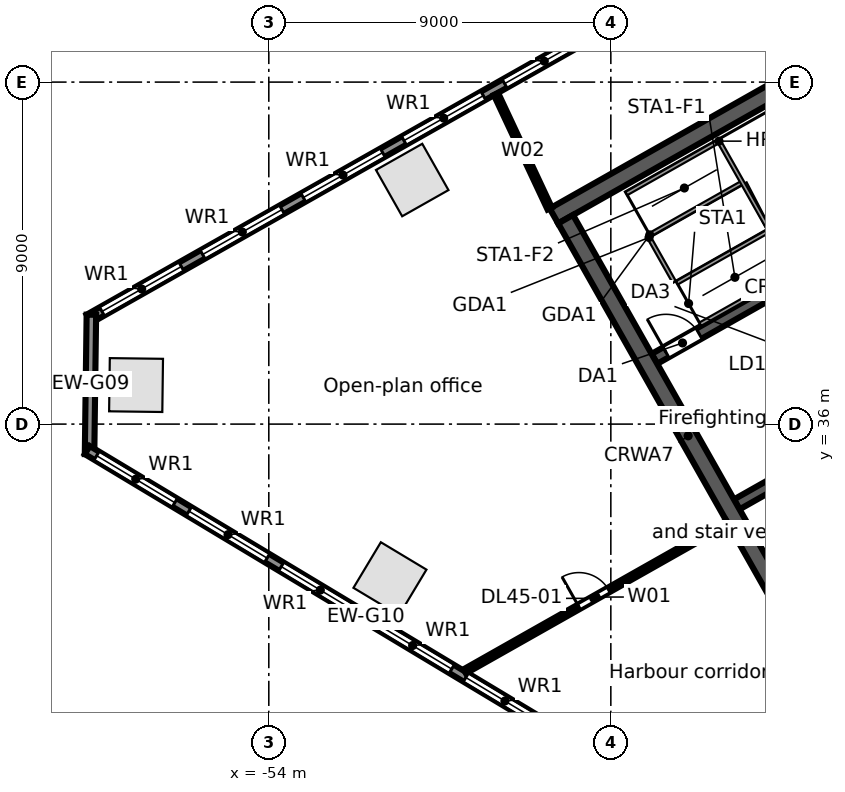
"""IFC4 building model, lengths in metres.
Left out: names, types, materials, properties, quantities, classifications, styles, units other than length and angle.
Written with IfcOpenShell. Run it as: python <this file> out.ifc"""

import sys

from ifc_helpers import new_model, si_unit, direction, frame, frame_2d, origin, origin_2d, place, context, subcontext, project, spatial, rectangle, extrude, element, fill, save


model = new_model("IFC4")
c1 = context("Model", 3, precision=1e-05, world=origin(), true_north=direction((0.0, 1.0)))
c2 = subcontext(c1, "Body", "Model", "MODEL_VIEW")
j1 = project(units=[si_unit("LENGTHUNIT", "METRE"), si_unit("PLANEANGLEUNIT", "RADIAN")], contexts=[c1])
p1 = place(None, origin())
s1 = spatial("IfcSite", under=j1, at=p1, CompositionType="ELEMENT")
p2 = place(p1, origin())
s2 = spatial("IfcBuilding", under=s1, at=p2, CompositionType="ELEMENT")
p3 = place(p2, frame((0.0, 0.0, 207.5)))
s3 = spatial("IfcBuildingStorey", under=s2, at=p3, CompositionType="ELEMENT", Elevation=207.5)
for number, where, z_axis, x_axis in (
    (1, (-50.226, 42.423, 0.0), (0.0, 0.0, 1.0), (-0.87, -0.492, 0.0)),
    (2, (-57.493, 37.027, 0.0), (0.0, 0.0, 1.0), (-0.013, -1.0, 0.0)),
    (3, (-50.812, 31.931, 0.0), (0.0, 0.0, 1.0), (0.857, -0.515, 0.0)),
):
    element("IfcColumn", number, at=place(p3, frame(where, z_axis=z_axis, x_axis=x_axis)), inside=s3, PredefinedType="COLUMN", context=c2, shape_type="SweptSolid", body=[
        extrude(rectangle(XDim=1.4, YDim=1.4, at=origin_2d()), origin(), (0.0, 0.0, 1.0), 3.9),
    ])
p4 = place(p3, frame((-58.732, 38.771, 0.0), z_axis=(0.0, 0.0, 1.0), x_axis=(0.870354824205, 0.492425100887, 0.0)))
e4 = element("IfcWall", 4, at=p4, inside=s3, PredefinedType="STANDARD", context=c2, shape_type="SweptSolid", body=[
    extrude(rectangle(XDim=64.006, YDim=0.25, at=frame_2d((32.003, 0.0))), origin(), (0.0, 0.0, 1.0), 3.62),
])
p5 = place(p4, frame((61.259, 0.0, 0.8)))
e5 = element("IfcOpeningElement", 5, at=p5, cuts=e4, PredefinedType="OPENING", context=c2, shape_type="SweptSolid", body=[
    extrude(rectangle(XDim=2.4, YDim=2.2, at=frame_2d((1.2, 1.1))), frame((0.0, 0.135, 0.0), z_axis=(0.0, -1.0, 0.0), x_axis=(1.0, 0.0, 0.0)), (0.0, 0.0, 1.0), 0.27),
])
p6 = place(p4, frame((58.216, 0.0, 0.8)))
e6 = element("IfcOpeningElement", 6, at=p6, cuts=e4, PredefinedType="OPENING", context=c2, shape_type="SweptSolid", body=[
    extrude(rectangle(XDim=2.4, YDim=2.2, at=frame_2d((1.2, 1.1))), frame((0.0, 0.135, 0.0), z_axis=(0.0, -1.0, 0.0), x_axis=(1.0, 0.0, 0.0)), (0.0, 0.0, 1.0), 0.27),
])
p7 = place(p4, frame((55.173, 0.0, 0.8)))
e7 = element("IfcOpeningElement", 7, at=p7, cuts=e4, PredefinedType="OPENING", context=c2, shape_type="SweptSolid", body=[
    extrude(rectangle(XDim=2.4, YDim=2.2, at=frame_2d((1.2, 1.1))), frame((0.0, 0.135, 0.0), z_axis=(0.0, -1.0, 0.0), x_axis=(1.0, 0.0, 0.0)), (0.0, 0.0, 1.0), 0.27),
])
p8 = place(p4, frame((52.129, 0.0, 0.8)))
e8 = element("IfcOpeningElement", 8, at=p8, cuts=e4, PredefinedType="OPENING", context=c2, shape_type="SweptSolid", body=[
    extrude(rectangle(XDim=2.4, YDim=2.2, at=frame_2d((1.2, 1.1))), frame((0.0, 0.135, 0.0), z_axis=(0.0, -1.0, 0.0), x_axis=(1.0, 0.0, 0.0)), (0.0, 0.0, 1.0), 0.27),
])
p9 = place(p4, frame((49.086, 0.0, 0.8)))
e9 = element("IfcOpeningElement", 9, at=p9, cuts=e4, PredefinedType="OPENING", context=c2, shape_type="SweptSolid", body=[
    extrude(rectangle(XDim=2.4, YDim=2.2, at=frame_2d((1.2, 1.1))), frame((0.0, 0.135, 0.0), z_axis=(0.0, -1.0, 0.0), x_axis=(1.0, 0.0, 0.0)), (0.0, 0.0, 1.0), 0.27),
])
p10 = place(p4, frame((46.043, 0.0, 0.8)))
e10 = element("IfcOpeningElement", 10, at=p10, cuts=e4, PredefinedType="OPENING", context=c2, shape_type="SweptSolid", body=[
    extrude(rectangle(XDim=2.4, YDim=2.2, at=frame_2d((1.2, 1.1))), frame((0.0, 0.135, 0.0), z_axis=(0.0, -1.0, 0.0), x_axis=(1.0, 0.0, 0.0)), (0.0, 0.0, 1.0), 0.27),
])
p11 = place(p4, frame((43.0, 0.0, 0.8)))
e11 = element("IfcOpeningElement", 11, at=p11, cuts=e4, PredefinedType="OPENING", context=c2, shape_type="SweptSolid", body=[
    extrude(rectangle(XDim=2.4, YDim=2.2, at=frame_2d((1.2, 1.1))), frame((0.0, 0.135, 0.0), z_axis=(0.0, -1.0, 0.0), x_axis=(1.0, 0.0, 0.0)), (0.0, 0.0, 1.0), 0.27),
])
p12 = place(p4, frame((39.956, 0.0, 0.8)))
e12 = element("IfcOpeningElement", 12, at=p12, cuts=e4, PredefinedType="OPENING", context=c2, shape_type="SweptSolid", body=[
    extrude(rectangle(XDim=2.4, YDim=2.2, at=frame_2d((1.2, 1.1))), frame((0.0, 0.135, 0.0), z_axis=(0.0, -1.0, 0.0), x_axis=(1.0, 0.0, 0.0)), (0.0, 0.0, 1.0), 0.27),
])
p13 = place(p4, frame((36.913, 0.0, 0.8)))
e13 = element("IfcOpeningElement", 13, at=p13, cuts=e4, PredefinedType="OPENING", context=c2, shape_type="SweptSolid", body=[
    extrude(rectangle(XDim=2.4, YDim=2.2, at=frame_2d((1.2, 1.1))), frame((0.0, 0.135, 0.0), z_axis=(0.0, -1.0, 0.0), x_axis=(1.0, 0.0, 0.0)), (0.0, 0.0, 1.0), 0.27),
])
p14 = place(p4, frame((33.87, 0.0, 0.8)))
e14 = element("IfcOpeningElement", 14, at=p14, cuts=e4, PredefinedType="OPENING", context=c2, shape_type="SweptSolid", body=[
    extrude(rectangle(XDim=2.4, YDim=2.2, at=frame_2d((1.2, 1.1))), frame((0.0, 0.135, 0.0), z_axis=(0.0, -1.0, 0.0), x_axis=(1.0, 0.0, 0.0)), (0.0, 0.0, 1.0), 0.27),
])
p15 = place(p4, frame((30.826, 0.0, 0.8)))
e15 = element("IfcOpeningElement", 15, at=p15, cuts=e4, PredefinedType="OPENING", context=c2, shape_type="SweptSolid", body=[
    extrude(rectangle(XDim=2.4, YDim=2.2, at=frame_2d((1.2, 1.1))), frame((0.0, 0.135, 0.0), z_axis=(0.0, -1.0, 0.0), x_axis=(1.0, 0.0, 0.0)), (0.0, 0.0, 1.0), 0.27),
])
p16 = place(p4, frame((27.783, 0.0, 0.8)))
e16 = element("IfcOpeningElement", 16, at=p16, cuts=e4, PredefinedType="OPENING", context=c2, shape_type="SweptSolid", body=[
    extrude(rectangle(XDim=2.4, YDim=2.2, at=frame_2d((1.2, 1.1))), frame((0.0, 0.135, 0.0), z_axis=(0.0, -1.0, 0.0), x_axis=(1.0, 0.0, 0.0)), (0.0, 0.0, 1.0), 0.27),
])
p17 = place(p4, frame((24.74, 0.0, 0.8)))
e17 = element("IfcOpeningElement", 17, at=p17, cuts=e4, PredefinedType="OPENING", context=c2, shape_type="SweptSolid", body=[
    extrude(rectangle(XDim=2.4, YDim=2.2, at=frame_2d((1.2, 1.1))), frame((0.0, 0.135, 0.0), z_axis=(0.0, -1.0, 0.0), x_axis=(1.0, 0.0, 0.0)), (0.0, 0.0, 1.0), 0.27),
])
p18 = place(p4, frame((21.696, 0.0, 0.8)))
e18 = element("IfcOpeningElement", 18, at=p18, cuts=e4, PredefinedType="OPENING", context=c2, shape_type="SweptSolid", body=[
    extrude(rectangle(XDim=2.4, YDim=2.2, at=frame_2d((1.2, 1.1))), frame((0.0, 0.135, 0.0), z_axis=(0.0, -1.0, 0.0), x_axis=(1.0, 0.0, 0.0)), (0.0, 0.0, 1.0), 0.27),
])
p19 = place(p4, frame((18.653, 0.0, 0.8)))
e19 = element("IfcOpeningElement", 19, at=p19, cuts=e4, PredefinedType="OPENING", context=c2, shape_type="SweptSolid", body=[
    extrude(rectangle(XDim=2.4, YDim=2.2, at=frame_2d((1.2, 1.1))), frame((0.0, 0.135, 0.0), z_axis=(0.0, -1.0, 0.0), x_axis=(1.0, 0.0, 0.0)), (0.0, 0.0, 1.0), 0.27),
])
p20 = place(p4, frame((15.61, 0.0, 0.8)))
e20 = element("IfcOpeningElement", 20, at=p20, cuts=e4, PredefinedType="OPENING", context=c2, shape_type="SweptSolid", body=[
    extrude(rectangle(XDim=2.4, YDim=2.2, at=frame_2d((1.2, 1.1))), frame((0.0, 0.135, 0.0), z_axis=(0.0, -1.0, 0.0), x_axis=(1.0, 0.0, 0.0)), (0.0, 0.0, 1.0), 0.27),
])
p21 = place(p4, frame((12.567, 0.0, 0.8)))
e21 = element("IfcOpeningElement", 21, at=p21, cuts=e4, PredefinedType="OPENING", context=c2, shape_type="SweptSolid", body=[
    extrude(rectangle(XDim=2.4, YDim=2.2, at=frame_2d((1.2, 1.1))), frame((0.0, 0.135, 0.0), z_axis=(0.0, -1.0, 0.0), x_axis=(1.0, 0.0, 0.0)), (0.0, 0.0, 1.0), 0.27),
])
p22 = place(p4, frame((9.523, 0.0, 0.8)))
e22 = element("IfcOpeningElement", 22, at=p22, cuts=e4, PredefinedType="OPENING", context=c2, shape_type="SweptSolid", body=[
    extrude(rectangle(XDim=2.4, YDim=2.2, at=frame_2d((1.2, 1.1))), frame((0.0, 0.135, 0.0), z_axis=(0.0, -1.0, 0.0), x_axis=(1.0, 0.0, 0.0)), (0.0, 0.0, 1.0), 0.27),
])
p23 = place(p4, frame((6.48, 0.0, 0.8)))
e23 = element("IfcOpeningElement", 23, at=p23, cuts=e4, PredefinedType="OPENING", context=c2, shape_type="SweptSolid", body=[
    extrude(rectangle(XDim=2.4, YDim=2.2, at=frame_2d((1.2, 1.1))), frame((0.0, 0.135, 0.0), z_axis=(0.0, -1.0, 0.0), x_axis=(1.0, 0.0, 0.0)), (0.0, 0.0, 1.0), 0.27),
])
p24 = place(p4, frame((3.437, 0.0, 0.8)))
e24 = element("IfcOpeningElement", 24, at=p24, cuts=e4, PredefinedType="OPENING", context=c2, shape_type="SweptSolid", body=[
    extrude(rectangle(XDim=2.4, YDim=2.2, at=frame_2d((1.2, 1.1))), frame((0.0, 0.135, 0.0), z_axis=(0.0, -1.0, 0.0), x_axis=(1.0, 0.0, 0.0)), (0.0, 0.0, 1.0), 0.27),
])
p25 = place(p4, frame((0.393, 0.0, 0.8)))
e25 = element("IfcOpeningElement", 25, at=p25, cuts=e4, PredefinedType="OPENING", context=c2, shape_type="SweptSolid", body=[
    extrude(rectangle(XDim=2.4, YDim=2.2, at=frame_2d((1.2, 1.1))), frame((0.0, 0.135, 0.0), z_axis=(0.0, -1.0, 0.0), x_axis=(1.0, 0.0, 0.0)), (0.0, 0.0, 1.0), 0.27),
])
p26 = place(p3, frame((-58.717, 35.208, 0.0), z_axis=(0.0, 0.0, 1.0), x_axis=(0.01310512158, 0.999914124207, 0.0)))
e26 = element("IfcWall", 26, at=p26, inside=s3, PredefinedType="STANDARD", context=c2, shape_type="SweptSolid", body=[
    extrude(rectangle(XDim=3.67, YDim=0.25, at=frame_2d((1.835, 0.0))), origin(), (0.0, 0.0, 1.0), 3.62),
])
p27 = place(p3, frame((-44.115, 26.507, 0.0), z_axis=(0.0, 0.0, 1.0), x_axis=(-0.857166583633, 0.515039268311, 0.0)))
e27 = element("IfcWall", 27, at=p27, inside=s3, PredefinedType="STANDARD", context=c2, shape_type="SweptSolid", body=[
    extrude(rectangle(XDim=17.106, YDim=0.25, at=frame_2d((8.553, 0.0))), origin(), (0.0, 0.0, 1.0), 3.62),
])
p28 = place(p27, frame((14.417, 0.0, 0.8)))
e28 = element("IfcOpeningElement", 28, at=p28, cuts=e27, PredefinedType="OPENING", context=c2, shape_type="SweptSolid", body=[
    extrude(rectangle(XDim=2.4, YDim=2.2, at=frame_2d((1.2, 1.1))), frame((0.0, 0.135, 0.0), z_axis=(0.0, -1.0, 0.0), x_axis=(1.0, 0.0, 0.0)), (0.0, 0.0, 1.0), 0.27),
])
p29 = place(p27, frame((11.584, 0.0, 0.8)))
e29 = element("IfcOpeningElement", 29, at=p29, cuts=e27, PredefinedType="OPENING", context=c2, shape_type="SweptSolid", body=[
    extrude(rectangle(XDim=2.4, YDim=2.2, at=frame_2d((1.2, 1.1))), frame((0.0, 0.135, 0.0), z_axis=(0.0, -1.0, 0.0), x_axis=(1.0, 0.0, 0.0)), (0.0, 0.0, 1.0), 0.27),
])
p30 = place(p27, frame((8.75, 0.0, 0.8)))
e30 = element("IfcOpeningElement", 30, at=p30, cuts=e27, PredefinedType="OPENING", context=c2, shape_type="SweptSolid", body=[
    extrude(rectangle(XDim=2.4, YDim=2.2, at=frame_2d((1.2, 1.1))), frame((0.0, 0.135, 0.0), z_axis=(0.0, -1.0, 0.0), x_axis=(1.0, 0.0, 0.0)), (0.0, 0.0, 1.0), 0.27),
])
p31 = place(p27, frame((5.917, 0.0, 0.8)))
e31 = element("IfcOpeningElement", 31, at=p31, cuts=e27, PredefinedType="OPENING", context=c2, shape_type="SweptSolid", body=[
    extrude(rectangle(XDim=2.4, YDim=2.2, at=frame_2d((1.2, 1.1))), frame((0.0, 0.135, 0.0), z_axis=(0.0, -1.0, 0.0), x_axis=(1.0, 0.0, 0.0)), (0.0, 0.0, 1.0), 0.27),
])
p32 = place(p27, frame((3.084, 0.0, 0.8)))
e32 = element("IfcOpeningElement", 32, at=p32, cuts=e27, PredefinedType="OPENING", context=c2, shape_type="SweptSolid", body=[
    extrude(rectangle(XDim=2.4, YDim=2.2, at=frame_2d((1.2, 1.1))), frame((0.0, 0.135, 0.0), z_axis=(0.0, -1.0, 0.0), x_axis=(1.0, 0.0, 0.0)), (0.0, 0.0, 1.0), 0.27),
])
p33 = place(p27, frame((0.25, 0.0, 0.8)))
e33 = element("IfcOpeningElement", 33, at=p33, cuts=e27, PredefinedType="OPENING", context=c2, shape_type="SweptSolid", body=[
    extrude(rectangle(XDim=2.4, YDim=2.2, at=frame_2d((1.2, 1.1))), frame((0.0, 0.135, 0.0), z_axis=(0.0, -1.0, 0.0), x_axis=(1.0, 0.0, 0.0)), (0.0, 0.0, 1.0), 0.27),
])
p34 = place(p3, frame((-41.687, 33.887, 0.0), z_axis=(0.0, 0.0, 1.0), x_axis=(0.870355736587, 0.49242348826, 0.0)))
e34 = element("IfcWall", 34, at=p34, inside=s3, PredefinedType="SOLIDWALL", context=c2, shape_type="SweptSolid", body=[
    extrude(rectangle(XDim=6.15, YDim=0.3, at=frame_2d((3.075, 0.0))), origin(), (0.0, 0.0, 1.0), 3.62),
])
p35 = place(p34, frame((1.25, 0.0, 0.0)))
e35 = element("IfcOpeningElement", 35, at=p35, cuts=e34, PredefinedType="OPENING", context=c2, shape_type="SweptSolid", body=[
    extrude(rectangle(XDim=1.1, YDim=2.1, at=frame_2d((0.55, 1.05))), frame((0.0, 0.16, 0.0), z_axis=(0.0, -1.0, 0.0), x_axis=(1.0, 0.0, 0.0)), (0.0, 0.0, 1.0), 0.32),
])
p36 = place(p34, frame((4.4, 0.0, 0.0)))
e36 = element("IfcOpeningElement", 36, at=p36, cuts=e34, PredefinedType="OPENING", context=c2, shape_type="SweptSolid", body=[
    extrude(rectangle(XDim=1.1, YDim=2.1, at=frame_2d((0.55, 1.05))), frame((0.0, 0.16, 0.0), z_axis=(0.0, -1.0, 0.0), x_axis=(1.0, 0.0, 0.0)), (0.0, 0.0, 1.0), 0.32),
])
p37 = place(p3, frame((-43.853, 37.717, 0.0), z_axis=(0.0, 0.0, 1.0), x_axis=(0.870360409231, 0.492415229297, 0.0)))
e37 = element("IfcWall", 37, at=p37, inside=s3, PredefinedType="SOLIDWALL", context=c2, shape_type="SweptSolid", body=[
    extrude(rectangle(XDim=7.55, YDim=0.3, at=frame_2d((3.775, 0.0))), origin(), (0.0, 0.0, 1.0), 3.62),
])
p38 = place(p37, frame((0.35, 0.0, 0.0)))
e38 = element("IfcOpeningElement", 38, at=p38, cuts=e37, PredefinedType="OPENING", context=c2, shape_type="SweptSolid", body=[
    extrude(rectangle(XDim=1.0, YDim=2.1, at=frame_2d((0.5, 1.05))), frame((0.0, 0.16, 0.0), z_axis=(0.0, -1.0, 0.0), x_axis=(1.0, 0.0, 0.0)), (0.0, 0.0, 1.0), 0.32),
])
p39 = place(p3, frame((-46.498, 41.477, 0.0), z_axis=(0.0, 0.0, 1.0), x_axis=(0.870359753402, 0.492416388494, 0.0)))
e39 = element("IfcWall", 39, at=p39, inside=s3, PredefinedType="SOLIDWALL", context=c2, shape_type="SweptSolid", body=[
    extrude(rectangle(XDim=17.0, YDim=0.45, at=frame_2d((8.5, 0.0))), origin(), (0.0, 0.0, 1.0), 3.62),
])
p40 = place(p3, frame((-46.191, 41.392, 0.0), z_axis=(0.0, 0.0, 1.0), x_axis=(0.492421378713, -0.870356930107, 0.0)))
e40 = element("IfcWall", 40, at=p40, inside=s3, PredefinedType="SOLIDWALL", context=c2, shape_type="SweptSolid", body=[
    extrude(rectangle(XDim=13.1, YDim=0.45, at=frame_2d((6.55, 0.0))), origin(), (0.0, 0.0, 1.0), 3.62),
])
p41 = place(p3, frame((-48.843, 29.494, 0.0), z_axis=(0.0, 0.0, 1.0), x_axis=(0.870384139606, 0.492373282705, 0.0)))
e41 = element("IfcWall", 41, at=p41, inside=s3, PredefinedType="PARTITIONING", context=c2, shape_type="SweptSolid", body=[
    extrude(rectangle(XDim=7.941, YDim=0.125, at=frame_2d((3.971, 0.0))), origin(), (0.0, 0.0, 1.0), 2.9),
])
p42 = place(p41, frame((3.45, 0.0, 0.0)))
e42 = element("IfcOpeningElement", 42, at=p42, cuts=e41, PredefinedType="OPENING", context=c2, shape_type="SweptSolid", body=[
    extrude(rectangle(XDim=0.9, YDim=2.1, at=frame_2d((0.45, 1.05))), frame((0.0, 0.073, 0.0), z_axis=(0.0, -1.0, 0.0), x_axis=(1.0, 0.0, 0.0)), (0.0, 0.0, 1.0), 0.145),
])
p43 = place(p3, frame((-48.022, 44.687, 0.0), z_axis=(0.0, 0.0, 1.0), x_axis=(0.424510917438, -0.905422818895, 0.0)))
e43 = element("IfcWall", 43, at=p43, inside=s3, PredefinedType="PARTITIONING", context=c2, shape_type="SweptSolid", body=[
    extrude(rectangle(XDim=3.329, YDim=0.125, at=frame_2d((1.665, 0.0))), origin(), (0.0, 0.0, 1.0), 2.988),
])
p44 = place(p21, origin())
e44 = element("IfcWindow", 44, at=p44, inside=s3, PartitioningType="SINGLE_PANEL", PredefinedType="WINDOW", context=c2, shape_type="SweptSolid", body=[
    extrude(rectangle(XDim=2.4, YDim=2.2, at=frame_2d((1.2, 1.1))), frame((0.0, 0.03, 0.0), z_axis=(0.0, -1.0, 0.0), x_axis=(1.0, 0.0, 0.0)), (0.0, 0.0, 1.0), 0.06),
])
fill(e21, e44)
p45 = place(p22, origin())
e45 = element("IfcWindow", 45, at=p45, inside=s3, PartitioningType="SINGLE_PANEL", PredefinedType="WINDOW", context=c2, shape_type="SweptSolid", body=[
    extrude(rectangle(XDim=2.4, YDim=2.2, at=frame_2d((1.2, 1.1))), frame((0.0, 0.03, 0.0), z_axis=(0.0, -1.0, 0.0), x_axis=(1.0, 0.0, 0.0)), (0.0, 0.0, 1.0), 0.06),
])
fill(e22, e45)
p46 = place(p23, origin())
e46 = element("IfcWindow", 46, at=p46, inside=s3, PartitioningType="SINGLE_PANEL", PredefinedType="WINDOW", context=c2, shape_type="SweptSolid", body=[
    extrude(rectangle(XDim=2.4, YDim=2.2, at=frame_2d((1.2, 1.1))), frame((0.0, 0.03, 0.0), z_axis=(0.0, -1.0, 0.0), x_axis=(1.0, 0.0, 0.0)), (0.0, 0.0, 1.0), 0.06),
])
fill(e23, e46)
p47 = place(p24, origin())
e47 = element("IfcWindow", 47, at=p47, inside=s3, PartitioningType="SINGLE_PANEL", PredefinedType="WINDOW", context=c2, shape_type="SweptSolid", body=[
    extrude(rectangle(XDim=2.4, YDim=2.2, at=frame_2d((1.2, 1.1))), frame((0.0, 0.03, 0.0), z_axis=(0.0, -1.0, 0.0), x_axis=(1.0, 0.0, 0.0)), (0.0, 0.0, 1.0), 0.06),
])
fill(e24, e47)
p48 = place(p25, origin())
e48 = element("IfcWindow", 48, at=p48, inside=s3, PartitioningType="SINGLE_PANEL", PredefinedType="WINDOW", context=c2, shape_type="SweptSolid", body=[
    extrude(rectangle(XDim=2.4, YDim=2.2, at=frame_2d((1.2, 1.1))), frame((0.0, 0.03, 0.0), z_axis=(0.0, -1.0, 0.0), x_axis=(1.0, 0.0, 0.0)), (0.0, 0.0, 1.0), 0.06),
])
fill(e25, e48)
p49 = place(p28, origin())
e49 = element("IfcWindow", 49, at=p49, inside=s3, PartitioningType="SINGLE_PANEL", PredefinedType="WINDOW", context=c2, shape_type="SweptSolid", body=[
    extrude(rectangle(XDim=2.4, YDim=2.2, at=frame_2d((1.2, 1.1))), frame((0.0, 0.03, 0.0), z_axis=(0.0, -1.0, 0.0), x_axis=(1.0, 0.0, 0.0)), (0.0, 0.0, 1.0), 0.06),
])
fill(e28, e49)
p50 = place(p29, origin())
e50 = element("IfcWindow", 50, at=p50, inside=s3, PartitioningType="SINGLE_PANEL", PredefinedType="WINDOW", context=c2, shape_type="SweptSolid", body=[
    extrude(rectangle(XDim=2.4, YDim=2.2, at=frame_2d((1.2, 1.1))), frame((0.0, 0.03, 0.0), z_axis=(0.0, -1.0, 0.0), x_axis=(1.0, 0.0, 0.0)), (0.0, 0.0, 1.0), 0.06),
])
fill(e29, e50)
p51 = place(p30, origin())
e51 = element("IfcWindow", 51, at=p51, inside=s3, PartitioningType="SINGLE_PANEL", PredefinedType="WINDOW", context=c2, shape_type="SweptSolid", body=[
    extrude(rectangle(XDim=2.4, YDim=2.2, at=frame_2d((1.2, 1.1))), frame((0.0, 0.03, 0.0), z_axis=(0.0, -1.0, 0.0), x_axis=(1.0, 0.0, 0.0)), (0.0, 0.0, 1.0), 0.06),
])
fill(e30, e51)
p52 = place(p31, origin())
e52 = element("IfcWindow", 52, at=p52, inside=s3, PartitioningType="SINGLE_PANEL", PredefinedType="WINDOW", context=c2, shape_type="SweptSolid", body=[
    extrude(rectangle(XDim=2.4, YDim=2.2, at=frame_2d((1.2, 1.1))), frame((0.0, 0.03, 0.0), z_axis=(0.0, -1.0, 0.0), x_axis=(1.0, 0.0, 0.0)), (0.0, 0.0, 1.0), 0.06),
])
fill(e31, e52)
p53 = place(p32, origin())
e53 = element("IfcWindow", 53, at=p53, inside=s3, PartitioningType="SINGLE_PANEL", PredefinedType="WINDOW", context=c2, shape_type="SweptSolid", body=[
    extrude(rectangle(XDim=2.4, YDim=2.2, at=frame_2d((1.2, 1.1))), frame((0.0, 0.03, 0.0), z_axis=(0.0, -1.0, 0.0), x_axis=(1.0, 0.0, 0.0)), (0.0, 0.0, 1.0), 0.06),
])
fill(e32, e53)
p54 = place(p38, origin())
e54 = element("IfcDoor", 54, at=p54, inside=s3, OperationType="SINGLE_SWING_LEFT", PredefinedType="DOOR", context=c2, shape_type="SweptSolid", body=[
    extrude(rectangle(XDim=1.0, YDim=2.1, at=frame_2d((0.5, 1.05))), frame((0.0, 0.025, 0.0), z_axis=(0.0, -1.0, 0.0), x_axis=(1.0, 0.0, 0.0)), (0.0, 0.0, 1.0), 0.05),
])
fill(e38, e54)
p55 = place(p42, origin())
e55 = element("IfcDoor", 55, at=p55, inside=s3, OperationType="SINGLE_SWING_LEFT", PredefinedType="DOOR", context=c2, shape_type="SweptSolid", body=[
    extrude(rectangle(XDim=0.9, YDim=2.1, at=frame_2d((0.45, 1.05))), frame((0.0, 0.025, 0.0), z_axis=(0.0, -1.0, 0.0), x_axis=(1.0, 0.0, 0.0)), (0.0, 0.0, 1.0), 0.05),
])
fill(e42, e55)
save(model, sys.argv[1])
